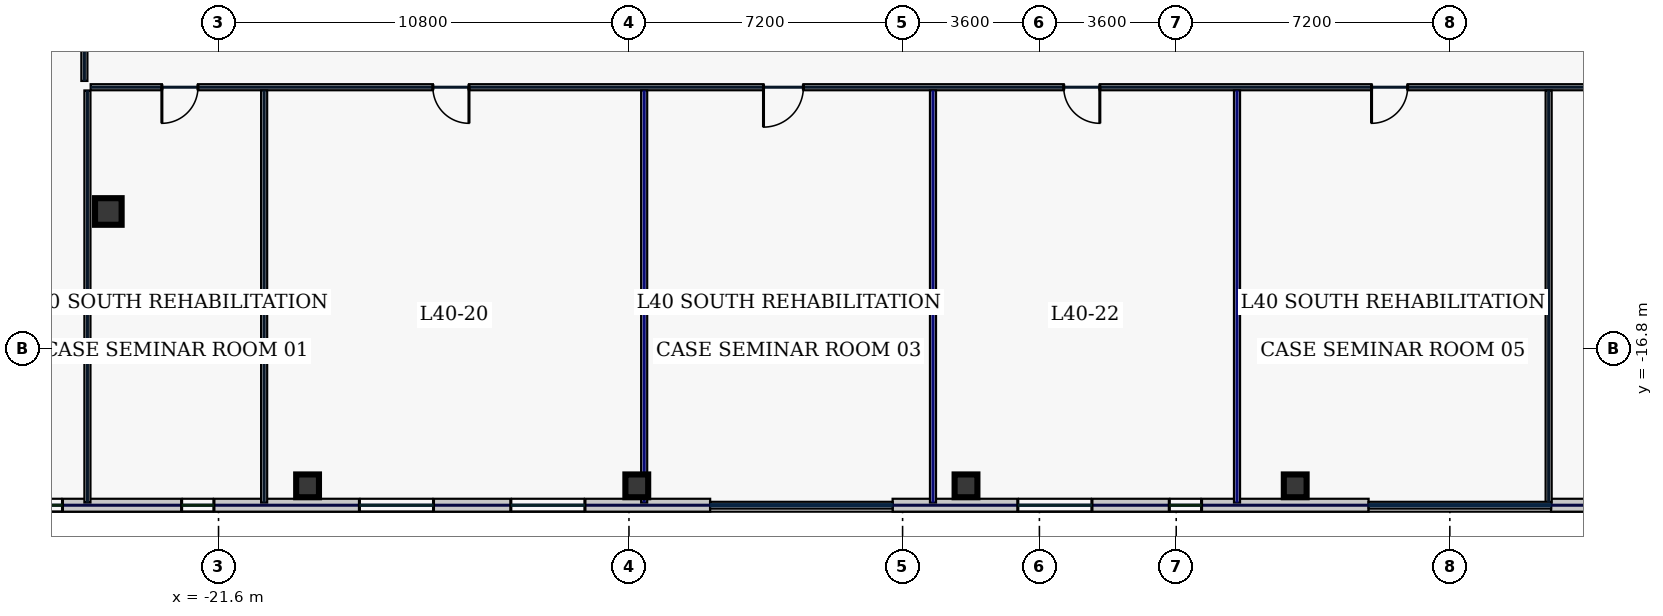
"""IFC4 building model, lengths in metres.
Left out: names, types, materials, properties, quantities, classifications, styles, units other than length and angle.
Written with IfcOpenShell. Run it as: python <this file> out.ifc"""

import sys

from ifc_helpers import new_model, si_unit, direction, frame, frame_2d, origin, origin_2d, place, context, subcontext, project, spatial, rectangle, hollow_rectangle, extrude, element, fill, save


model = new_model("IFC4")
c1 = context("Model", 3, precision=1e-05, world=origin(), true_north=direction((0.0, 1.0)))
c2 = subcontext(c1, "Body", "Model", "MODEL_VIEW")
j1 = project(units=[si_unit("LENGTHUNIT", "METRE"), si_unit("PLANEANGLEUNIT", "RADIAN")], contexts=[c1])
p1 = place(None, origin())
s1 = spatial("IfcSite", under=j1, at=p1, CompositionType="ELEMENT")
p2 = place(p1, origin())
s2 = spatial("IfcBuilding", under=s1, at=p2, CompositionType="ELEMENT")
p3 = place(p2, frame((0.0, 0.0, 176.2)))
s3 = spatial("IfcBuildingStorey", under=s2, at=p3, CompositionType="ELEMENT", Elevation=176.2)
p4 = place(p3, frame((-24.5, -13.2, 0.0), z_axis=(0.0, 0.0, 1.0), x_axis=(1.0, 0.0, 0.0)))
e1 = element("IfcColumn", 1, at=p4, inside=s3, PredefinedType="COLUMN", context=c2, shape_type="SweptSolid", body=[
    extrude(hollow_rectangle(XDim=0.7, YDim=0.7, WallThickness=0.032, at=origin_2d()), origin(), (0.0, 0.0, 1.0), 3.74),
])
for number, where, z_axis, x_axis in (
    (2, (-19.257, -20.42, 0.0), (0.0, 0.0, 1.0), (1.0, 0.0, 0.0)),
    (3, (-10.594, -20.42, 0.0), (0.0, 0.0, 1.0), (1.0, 0.0, 0.0)),
    (4, (-1.931, -20.42, 0.0), (0.0, 0.0, 1.0), (1.0, 0.0, 0.0)),
    (5, (6.731, -20.42, 0.0), (0.0, 0.0, 1.0), (1.0, 0.0, 0.0)),
):
    element("IfcColumn", number, at=place(p3, frame(where, z_axis=z_axis, x_axis=x_axis)), inside=s3, PredefinedType="COLUMN", context=c2, shape_type="SweptSolid", body=[
        extrude(hollow_rectangle(XDim=0.6, YDim=0.6, WallThickness=0.028, at=origin_2d()), origin(), (0.0, 0.0, 1.0), 3.74),
    ])
p5 = place(p3, frame((-28.6, -20.93, 0.0), z_axis=(0.0, 0.0, 1.0), x_axis=(1.0, 0.0, 0.0)))
e6 = element("IfcWall", 6, at=p5, inside=s3, PredefinedType="STANDARD", context=c2, shape_type="SweptSolid", body=[
    extrude(rectangle(XDim=19.937, YDim=0.34, at=frame_2d((9.969, 0.0))), origin(), (0.0, 0.0, 1.0), 3.74),
])
p6 = place(p5, frame((2.044, 0.0, 0.8)))
e7 = element("IfcOpeningElement", 7, at=p6, cuts=e6, PredefinedType="OPENING", context=c2, shape_type="SweptSolid", body=[
    extrude(rectangle(XDim=0.85, YDim=1.85, at=frame_2d((0.425, 0.925))), frame((0.0, 0.18, 0.0), z_axis=(0.0, -1.0, 0.0), x_axis=(1.0, 0.0, 0.0)), (0.0, 0.0, 1.0), 0.36),
])
p7 = place(p5, frame((6.029, 0.0, 0.8)))
e8 = element("IfcOpeningElement", 8, at=p7, cuts=e6, PredefinedType="OPENING", context=c2, shape_type="SweptSolid", body=[
    extrude(rectangle(XDim=0.85, YDim=1.85, at=frame_2d((0.425, 0.925))), frame((0.0, 0.18, 0.0), z_axis=(0.0, -1.0, 0.0), x_axis=(1.0, 0.0, 0.0)), (0.0, 0.0, 1.0), 0.36),
])
p8 = place(p5, frame((10.707, 0.0, 0.8)))
e9 = element("IfcOpeningElement", 9, at=p8, cuts=e6, PredefinedType="OPENING", context=c2, shape_type="SweptSolid", body=[
    extrude(rectangle(XDim=1.95, YDim=2.1, at=frame_2d((0.975, 1.05))), frame((0.0, 0.18, 0.0), z_axis=(0.0, -1.0, 0.0), x_axis=(1.0, 0.0, 0.0)), (0.0, 0.0, 1.0), 0.36),
])
p9 = place(p5, frame((14.692, 0.0, 0.8)))
e10 = element("IfcOpeningElement", 10, at=p9, cuts=e6, PredefinedType="OPENING", context=c2, shape_type="SweptSolid", body=[
    extrude(rectangle(XDim=1.95, YDim=2.1, at=frame_2d((0.975, 1.05))), frame((0.0, 0.18, 0.0), z_axis=(0.0, -1.0, 0.0), x_axis=(1.0, 0.0, 0.0)), (0.0, 0.0, 1.0), 0.36),
])
p10 = place(p3, frame((-3.863, -20.93, 0.0), z_axis=(0.0, 0.0, 1.0), x_axis=(1.0, 0.0, 0.0)))
e11 = element("IfcWall", 11, at=p10, inside=s3, PredefinedType="STANDARD", context=c2, shape_type="SweptSolid", body=[
    extrude(rectangle(XDim=12.526, YDim=0.34, at=frame_2d((6.263, 0.0))), origin(), (0.0, 0.0, 1.0), 3.74),
])
p11 = place(p10, frame((3.295, 0.0, 0.8)))
e12 = element("IfcOpeningElement", 12, at=p11, cuts=e11, PredefinedType="OPENING", context=c2, shape_type="SweptSolid", body=[
    extrude(rectangle(XDim=1.95, YDim=2.1, at=frame_2d((0.975, 1.05))), frame((0.0, 0.18, 0.0), z_axis=(0.0, -1.0, 0.0), x_axis=(1.0, 0.0, 0.0)), (0.0, 0.0, 1.0), 0.36),
])
p12 = place(p10, frame((7.28, 0.0, 0.8)))
e13 = element("IfcOpeningElement", 13, at=p12, cuts=e11, PredefinedType="OPENING", context=c2, shape_type="SweptSolid", body=[
    extrude(rectangle(XDim=0.85, YDim=1.85, at=frame_2d((0.425, 0.925))), frame((0.0, 0.18, 0.0), z_axis=(0.0, -1.0, 0.0), x_axis=(1.0, 0.0, 0.0)), (0.0, 0.0, 1.0), 0.36),
])
p13 = place(p3, frame((13.463, -20.93, 0.0), z_axis=(0.0, 0.0, 1.0), x_axis=(1.0, 0.0, 0.0)))
e14 = element("IfcWall", 14, at=p13, inside=s3, PredefinedType="STANDARD", context=c2, shape_type="SweptSolid", body=[
    extrude(rectangle(XDim=19.937, YDim=0.34, at=frame_2d((9.969, 0.0))), origin(), (0.0, 0.0, 1.0), 3.74),
])
p14 = place(p13, frame((3.295, 0.0, 0.8)))
e15 = element("IfcOpeningElement", 15, at=p14, cuts=e14, PredefinedType="OPENING", context=c2, shape_type="SweptSolid", body=[
    extrude(rectangle(XDim=1.95, YDim=2.1, at=frame_2d((0.975, 1.05))), frame((0.0, 0.18, 0.0), z_axis=(0.0, -1.0, 0.0), x_axis=(1.0, 0.0, 0.0)), (0.0, 0.0, 1.0), 0.36),
])
p15 = place(p13, frame((8.38, 0.0, 0.8)))
e16 = element("IfcOpeningElement", 16, at=p15, cuts=e14, PredefinedType="OPENING", context=c2, shape_type="SweptSolid", body=[
    extrude(rectangle(XDim=0.85, YDim=1.85, at=frame_2d((0.425, 0.925))), frame((0.0, 0.18, 0.0), z_axis=(0.0, -1.0, 0.0), x_axis=(1.0, 0.0, 0.0)), (0.0, 0.0, 1.0), 0.36),
])
p16 = place(p13, frame((13.058, 0.0, 0.8)))
e17 = element("IfcOpeningElement", 17, at=p16, cuts=e14, PredefinedType="OPENING", context=c2, shape_type="SweptSolid", body=[
    extrude(rectangle(XDim=0.85, YDim=1.85, at=frame_2d((0.425, 0.925))), frame((0.0, 0.18, 0.0), z_axis=(0.0, -1.0, 0.0), x_axis=(1.0, 0.0, 0.0)), (0.0, 0.0, 1.0), 0.36),
])
p17 = place(p13, frame((15.943, 0.0, 0.8)))
e18 = element("IfcOpeningElement", 18, at=p17, cuts=e14, PredefinedType="OPENING", context=c2, shape_type="SweptSolid", body=[
    extrude(rectangle(XDim=1.95, YDim=2.1, at=frame_2d((0.975, 1.05))), frame((0.0, 0.18, 0.0), z_axis=(0.0, -1.0, 0.0), x_axis=(1.0, 0.0, 0.0)), (0.0, 0.0, 1.0), 0.36),
])
p18 = place(p3, frame((-25.13, -9.765, 0.0), z_axis=(0.0, 0.0, 1.0), x_axis=(0.0, 1.0, 0.0)))
e19 = element("IfcWall", 19, at=p18, inside=s3, PredefinedType="PARTITIONING", context=c2, shape_type="SweptSolid", body=[
    extrude(rectangle(XDim=2.98, YDim=0.16, at=frame_2d((1.49, 0.0))), origin(), (0.0, 0.0, 1.0), 3.74),
])
p19 = place(p18, frame((1.1, 0.0, 0.0)))
e20 = element("IfcOpeningElement", 20, at=p19, cuts=e19, PredefinedType="OPENING", context=c2, shape_type="SweptSolid", body=[
    extrude(rectangle(XDim=0.95, YDim=2.2, at=frame_2d((0.475, 1.1))), frame((0.0, 0.09, 0.0), z_axis=(0.0, -1.0, 0.0), x_axis=(1.0, 0.0, 0.0)), (0.0, 0.0, 1.0), 0.18),
])
p20 = place(p3, frame((24.965, -9.93, 0.0), z_axis=(0.0, 0.0, 1.0), x_axis=(-1.0, 0.0, 0.0)))
e21 = element("IfcWall", 21, at=p20, inside=s3, PredefinedType="PARTITIONING", context=c2, shape_type="SweptSolid", body=[
    extrude(rectangle(XDim=49.93, YDim=0.16, at=frame_2d((24.965, 0.0))), origin(), (0.0, 0.0, 1.0), 3.74),
])
p21 = place(p20, frame((47.106, 0.0, 0.0)))
e22 = element("IfcOpeningElement", 22, at=p21, cuts=e21, PredefinedType="OPENING", context=c2, shape_type="SweptSolid", body=[
    extrude(rectangle(XDim=0.95, YDim=2.2, at=frame_2d((0.475, 1.1))), frame((0.0, 0.09, 0.0), z_axis=(0.0, -1.0, 0.0), x_axis=(1.0, 0.0, 0.0)), (0.0, 0.0, 1.0), 0.18),
])
p22 = place(p20, frame((39.975, 0.0, 0.0)))
e23 = element("IfcOpeningElement", 23, at=p22, cuts=e21, PredefinedType="OPENING", context=c2, shape_type="SweptSolid", body=[
    extrude(rectangle(XDim=0.95, YDim=2.2, at=frame_2d((0.475, 1.1))), frame((0.0, 0.09, 0.0), z_axis=(0.0, -1.0, 0.0), x_axis=(1.0, 0.0, 0.0)), (0.0, 0.0, 1.0), 0.18),
])
p23 = place(p20, frame((31.175, 0.0, 0.0)))
e24 = element("IfcOpeningElement", 24, at=p23, cuts=e21, PredefinedType="OPENING", context=c2, shape_type="SweptSolid", body=[
    extrude(rectangle(XDim=1.05, YDim=2.2, at=frame_2d((0.525, 1.1))), frame((0.0, 0.09, 0.0), z_axis=(0.0, -1.0, 0.0), x_axis=(1.0, 0.0, 0.0)), (0.0, 0.0, 1.0), 0.18),
])
p24 = place(p20, frame((23.375, 0.0, 0.0)))
e25 = element("IfcOpeningElement", 25, at=p24, cuts=e21, PredefinedType="OPENING", context=c2, shape_type="SweptSolid", body=[
    extrude(rectangle(XDim=0.95, YDim=2.2, at=frame_2d((0.475, 1.1))), frame((0.0, 0.09, 0.0), z_axis=(0.0, -1.0, 0.0), x_axis=(1.0, 0.0, 0.0)), (0.0, 0.0, 1.0), 0.18),
])
p25 = place(p20, frame((15.275, 0.0, 0.0)))
e26 = element("IfcOpeningElement", 26, at=p25, cuts=e21, PredefinedType="OPENING", context=c2, shape_type="SweptSolid", body=[
    extrude(rectangle(XDim=0.95, YDim=2.2, at=frame_2d((0.475, 1.1))), frame((0.0, 0.09, 0.0), z_axis=(0.0, -1.0, 0.0), x_axis=(1.0, 0.0, 0.0)), (0.0, 0.0, 1.0), 0.18),
])
p26 = place(p20, frame((7.675, 0.0, 0.0)))
e27 = element("IfcOpeningElement", 27, at=p26, cuts=e21, PredefinedType="OPENING", context=c2, shape_type="SweptSolid", body=[
    extrude(rectangle(XDim=1.15, YDim=2.2, at=frame_2d((0.575, 1.1))), frame((0.0, 0.09, 0.0), z_axis=(0.0, -1.0, 0.0), x_axis=(1.0, 0.0, 0.0)), (0.0, 0.0, 1.0), 0.18),
])
p27 = place(p20, frame((2.044, 0.0, 0.0)))
e28 = element("IfcOpeningElement", 28, at=p27, cuts=e21, PredefinedType="OPENING", context=c2, shape_type="SweptSolid", body=[
    extrude(rectangle(XDim=0.95, YDim=2.2, at=frame_2d((0.475, 1.1))), frame((0.0, 0.09, 0.0), z_axis=(0.0, -1.0, 0.0), x_axis=(1.0, 0.0, 0.0)), (0.0, 0.0, 1.0), 0.18),
])
for number, where, z_axis, x_axis in (
    (29, (-25.05, -20.86, 0.0), (0.0, 0.0, 1.0), (0.0, 1.0, 0.0)),
    (30, (-20.4, -20.86, 0.0), (0.0, 0.0, 1.0), (0.0, 1.0, 0.0)),
):
    element("IfcWall", number, at=place(p3, frame(where, z_axis=z_axis, x_axis=x_axis)), inside=s3, PredefinedType="PARTITIONING", context=c2, shape_type="SweptSolid", body=[
        extrude(rectangle(XDim=10.845, YDim=0.16, at=frame_2d((5.423, 0.0))), origin(), (0.0, 0.0, 1.0), 3.74),
    ])
for number, where, z_axis, x_axis in (
    (31, (-10.4, -20.86, 0.0), (0.0, 0.0, 1.0), (0.0, 1.0, 0.0)),
    (32, (-2.8, -20.86, 0.0), (0.0, 0.0, 1.0), (0.0, 1.0, 0.0)),
    (33, (5.2, -20.86, 0.0), (0.0, 0.0, 1.0), (0.0, 1.0, 0.0)),
):
    element("IfcWall", number, at=place(p3, frame(where, z_axis=z_axis, x_axis=x_axis)), inside=s3, PredefinedType="PARTITIONING", context=c2, shape_type="SweptSolid", body=[
        extrude(rectangle(XDim=10.845, YDim=0.16, at=frame_2d((5.423, 0.0))), origin(), (0.0, 0.0, 1.0), 3.285),
    ])
p28 = place(p3, frame((13.4, -20.86, 0.0), z_axis=(0.0, 0.0, 1.0), x_axis=(0.0, 1.0, 0.0)))
e34 = element("IfcWall", 34, at=p28, inside=s3, PredefinedType="PARTITIONING", context=c2, shape_type="SweptSolid", body=[
    extrude(rectangle(XDim=10.845, YDim=0.16, at=frame_2d((5.423, 0.0))), origin(), (0.0, 0.0, 1.0), 3.74),
])
p29 = place(p6, origin())
e35 = element("IfcWindow", 35, at=p29, inside=s3, PartitioningType="SINGLE_PANEL", PredefinedType="WINDOW", context=c2, shape_type="SweptSolid", body=[
    extrude(rectangle(XDim=0.85, YDim=1.85, at=frame_2d((0.425, 0.925))), frame((0.0, 0.03, 0.0), z_axis=(0.0, -1.0, 0.0), x_axis=(1.0, 0.0, 0.0)), (0.0, 0.0, 1.0), 0.06),
])
fill(e7, e35)
p30 = place(p7, origin())
e36 = element("IfcWindow", 36, at=p30, inside=s3, PartitioningType="SINGLE_PANEL", PredefinedType="WINDOW", context=c2, shape_type="SweptSolid", body=[
    extrude(rectangle(XDim=0.85, YDim=1.85, at=frame_2d((0.425, 0.925))), frame((0.0, 0.03, 0.0), z_axis=(0.0, -1.0, 0.0), x_axis=(1.0, 0.0, 0.0)), (0.0, 0.0, 1.0), 0.06),
])
fill(e8, e36)
p31 = place(p8, origin())
e37 = element("IfcWindow", 37, at=p31, inside=s3, PartitioningType="SINGLE_PANEL", PredefinedType="WINDOW", context=c2, shape_type="SweptSolid", body=[
    extrude(rectangle(XDim=1.95, YDim=2.1, at=frame_2d((0.975, 1.05))), frame((0.0, 0.03, 0.0), z_axis=(0.0, -1.0, 0.0), x_axis=(1.0, 0.0, 0.0)), (0.0, 0.0, 1.0), 0.06),
])
fill(e9, e37)
p32 = place(p9, origin())
e38 = element("IfcWindow", 38, at=p32, inside=s3, PartitioningType="SINGLE_PANEL", PredefinedType="WINDOW", context=c2, shape_type="SweptSolid", body=[
    extrude(rectangle(XDim=1.95, YDim=2.1, at=frame_2d((0.975, 1.05))), frame((0.0, 0.03, 0.0), z_axis=(0.0, -1.0, 0.0), x_axis=(1.0, 0.0, 0.0)), (0.0, 0.0, 1.0), 0.06),
])
fill(e10, e38)
p33 = place(p11, origin())
e39 = element("IfcWindow", 39, at=p33, inside=s3, PartitioningType="SINGLE_PANEL", PredefinedType="WINDOW", context=c2, shape_type="SweptSolid", body=[
    extrude(rectangle(XDim=1.95, YDim=2.1, at=frame_2d((0.975, 1.05))), frame((0.0, 0.03, 0.0), z_axis=(0.0, -1.0, 0.0), x_axis=(1.0, 0.0, 0.0)), (0.0, 0.0, 1.0), 0.06),
])
fill(e12, e39)
p34 = place(p12, origin())
e40 = element("IfcWindow", 40, at=p34, inside=s3, PartitioningType="SINGLE_PANEL", PredefinedType="WINDOW", context=c2, shape_type="SweptSolid", body=[
    extrude(rectangle(XDim=0.85, YDim=1.85, at=frame_2d((0.425, 0.925))), frame((0.0, 0.03, 0.0), z_axis=(0.0, -1.0, 0.0), x_axis=(1.0, 0.0, 0.0)), (0.0, 0.0, 1.0), 0.06),
])
fill(e13, e40)
p35 = place(p21, origin())
e41 = element("IfcDoor", 41, at=p35, inside=s3, OperationType="SINGLE_SWING_RIGHT", PredefinedType="DOOR", context=c2, shape_type="SweptSolid", body=[
    extrude(rectangle(XDim=0.95, YDim=2.2, at=frame_2d((0.475, 1.1))), frame((0.0, 0.025, 0.0), z_axis=(0.0, -1.0, 0.0), x_axis=(1.0, 0.0, 0.0)), (0.0, 0.0, 1.0), 0.05),
])
fill(e22, e41)
p36 = place(p22, origin())
e42 = element("IfcDoor", 42, at=p36, inside=s3, OperationType="SINGLE_SWING_LEFT", PredefinedType="DOOR", context=c2, shape_type="SweptSolid", body=[
    extrude(rectangle(XDim=0.95, YDim=2.2, at=frame_2d((0.475, 1.1))), frame((0.0, 0.025, 0.0), z_axis=(0.0, -1.0, 0.0), x_axis=(1.0, 0.0, 0.0)), (0.0, 0.0, 1.0), 0.05),
])
fill(e23, e42)
p37 = place(p23, origin())
e43 = element("IfcDoor", 43, at=p37, inside=s3, OperationType="SINGLE_SWING_RIGHT", PredefinedType="DOOR", context=c2, shape_type="SweptSolid", body=[
    extrude(rectangle(XDim=1.05, YDim=2.2, at=frame_2d((0.525, 1.1))), frame((0.0, 0.025, 0.0), z_axis=(0.0, -1.0, 0.0), x_axis=(1.0, 0.0, 0.0)), (0.0, 0.0, 1.0), 0.05),
])
fill(e24, e43)
p38 = place(p24, origin())
e44 = element("IfcDoor", 44, at=p38, inside=s3, OperationType="SINGLE_SWING_LEFT", PredefinedType="DOOR", context=c2, shape_type="SweptSolid", body=[
    extrude(rectangle(XDim=0.95, YDim=2.2, at=frame_2d((0.475, 1.1))), frame((0.0, 0.025, 0.0), z_axis=(0.0, -1.0, 0.0), x_axis=(1.0, 0.0, 0.0)), (0.0, 0.0, 1.0), 0.05),
])
fill(e25, e44)
p39 = place(p25, origin())
e45 = element("IfcDoor", 45, at=p39, inside=s3, OperationType="SINGLE_SWING_RIGHT", PredefinedType="DOOR", context=c2, shape_type="SweptSolid", body=[
    extrude(rectangle(XDim=0.95, YDim=2.2, at=frame_2d((0.475, 1.1))), frame((0.0, 0.025, 0.0), z_axis=(0.0, -1.0, 0.0), x_axis=(1.0, 0.0, 0.0)), (0.0, 0.0, 1.0), 0.05),
])
fill(e26, e45)
save(model, sys.argv[1])
